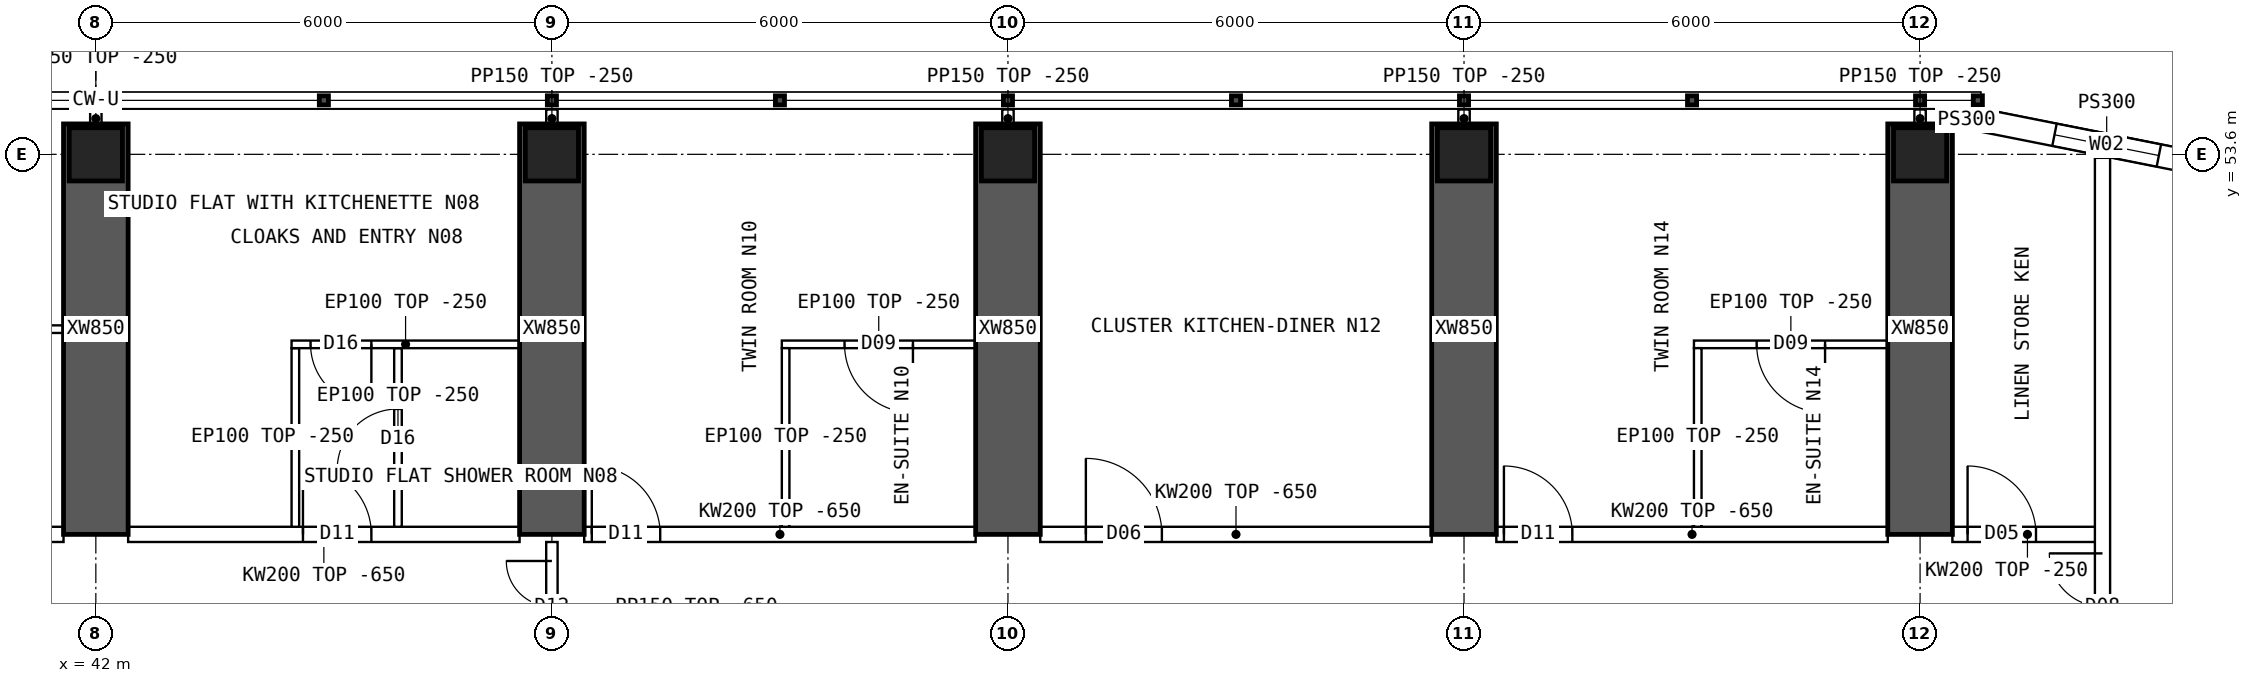
"""IFC4 building model, lengths in metres.
Left out: names, types, materials, properties, quantities, classifications, styles, units other than length and angle.
Written with IfcOpenShell. Run it as: python <this file> out.ifc"""

import sys

from ifc_helpers import new_model, si_unit, direction, frame, frame_2d, origin, origin_2d, place, context, subcontext, project, spatial, polyline, rectangle, hollow_rectangle, outline, extrude, element, fill, save


model = new_model("IFC4")
c1 = context("Model", 3, precision=1e-05, world=origin(), true_north=direction((0.0, 1.0)))
c2 = subcontext(c1, "Body", "Model", "MODEL_VIEW")
j1 = project(units=[si_unit("LENGTHUNIT", "METRE"), si_unit("PLANEANGLEUNIT", "RADIAN")], contexts=[c1])
p1 = place(None, origin())
s1 = spatial("IfcSite", under=j1, at=p1, CompositionType="ELEMENT")
p2 = place(p1, origin())
s2 = spatial("IfcBuilding", under=s1, at=p2, CompositionType="ELEMENT")
p3 = place(p2, frame((0.0, 0.0, 152.35)))
s3 = spatial("IfcBuildingStorey", under=s2, at=p3, CompositionType="ELEMENT", Elevation=152.35)
for number, where, z_axis, x_axis in (
    (1, (42.0, 53.6, 0.0), (0.0, 0.0, 1.0), (1.0, 0.0, 0.0)),
    (2, (48.0, 53.6, 0.0), (0.0, 0.0, 1.0), (1.0, 0.0, 0.0)),
    (3, (54.0, 53.6, 0.0), (0.0, 0.0, 1.0), (1.0, 0.0, 0.0)),
    (4, (60.0, 53.6, 0.0), (0.0, 0.0, 1.0), (1.0, 0.0, 0.0)),
    (5, (66.0, 53.6, 0.0), (0.0, 0.0, 1.0), (1.0, 0.0, 0.0)),
):
    element("IfcColumn", number, at=place(p3, frame(where, z_axis=z_axis, x_axis=x_axis)), inside=s3, PredefinedType="COLUMN", context=c2, shape_type="SweptSolid", body=[
        extrude(hollow_rectangle(XDim=0.7, YDim=0.7, WallThickness=0.07, at=origin_2d()), origin(), (0.0, 0.0, 1.0), 3.75),
    ])
for number, where, z_axis, x_axis in (
    (6, (42.0, 48.6, 0.0), (0.0, 0.0, 1.0), (0.0, 1.0, 0.0)),
    (7, (48.0, 48.6, 0.0), (0.0, 0.0, 1.0), (0.0, 1.0, 0.0)),
    (8, (54.0, 48.6, 0.0), (0.0, 0.0, 1.0), (0.0, 1.0, 0.0)),
    (9, (60.0, 48.6, 0.0), (0.0, 0.0, 1.0), (0.0, 1.0, 0.0)),
    (10, (66.0, 48.6, 0.0), (0.0, 0.0, 1.0), (0.0, 1.0, 0.0)),
):
    element("IfcWall", number, at=place(p3, frame(where, z_axis=z_axis, x_axis=x_axis)), inside=s3, PredefinedType="SHEAR", context=c2, shape_type="SweptSolid", body=[
        extrude(rectangle(XDim=5.4, YDim=0.85, at=frame_2d((2.7, 0.0))), origin(), (0.0, 0.0, 1.0), 3.75),
    ])
p4 = place(p3, frame((70.11, 53.392, 0.0), z_axis=(0.0, 0.0, 1.0), x_axis=(-0.98078325777, 0.195100490205, 0.0)))
e11 = element("IfcWall", 11, at=p4, inside=s3, PredefinedType="SOLIDWALL", context=c2, shape_type="SweptSolid", body=[
    extrude(outline(polyline([(-0.03, -0.15), (3.405, -0.15), (3.345, 0.15), (0.03, 0.15), (-0.03, -0.15)])), origin(), (0.0, 0.0, 1.0), 3.5),
])
p5 = place(p4, frame((0.988, 0.0, 0.9)))
e12 = element("IfcOpeningElement", 12, at=p5, cuts=e11, PredefinedType="OPENING", context=c2, shape_type="SweptSolid", body=[
    extrude(rectangle(XDim=1.4, YDim=1.8, at=frame_2d((0.7, 0.9))), frame((0.0, 0.16, 0.0), z_axis=(0.0, -1.0, 0.0), x_axis=(1.0, 0.0, 0.0)), (0.0, 0.0, 1.0), 0.32),
])
p6 = place(p3, frame((66.8, 54.05, 0.0), z_axis=(0.0, 0.0, 1.0), x_axis=(-1.0, 0.0, 0.0)))
e13 = element("IfcWall", 13, at=p6, inside=s3, PredefinedType="SOLIDWALL", context=c2, shape_type="SweptSolid", body=[
    extrude(rectangle(XDim=0.375, YDim=0.3, at=frame_2d((0.188, 0.0))), origin(), (0.0, 0.0, 1.0), 3.5),
])
p7 = place(p3, frame((36.425, 48.6, 0.0), z_axis=(0.0, 0.0, 1.0), x_axis=(1.0, 0.0, 0.0)))
e14 = element("IfcWall", 14, at=p7, inside=s3, PredefinedType="SOLIDWALL", context=c2, shape_type="SweptSolid", body=[
    extrude(outline(polyline([(0.0, 0.0), (5.15, 0.0), (5.15, 3.1), (0.0, 3.1), (0.0, 0.0)])), frame((0.0, 0.1, 0.0), z_axis=(0.0, -1.0, 0.0), x_axis=(1.0, 0.0, 0.0)), (0.0, 0.0, 1.0), 0.2),
])
p8 = place(p7, frame((0.3, 0.0, 0.0)))
e15 = element("IfcOpeningElement", 15, at=p8, cuts=e14, PredefinedType="OPENING", context=c2, shape_type="SweptSolid", body=[
    extrude(rectangle(XDim=1.0, YDim=2.1, at=frame_2d((0.5, 1.05))), frame((0.0, 0.11, 0.0), z_axis=(0.0, -1.0, 0.0), x_axis=(1.0, 0.0, 0.0)), (0.0, 0.0, 1.0), 0.22),
])
p9 = place(p3, frame((42.425, 48.6, 0.0), z_axis=(0.0, 0.0, 1.0), x_axis=(1.0, 0.0, 0.0)))
e16 = element("IfcWall", 16, at=p9, inside=s3, PredefinedType="SOLIDWALL", context=c2, shape_type="SweptSolid", body=[
    extrude(outline(polyline([(0.0, 0.0), (5.15, 0.0), (5.15, 3.1), (0.0, 3.1), (0.0, 0.0)])), frame((0.0, 0.1, 0.0), z_axis=(0.0, -1.0, 0.0), x_axis=(1.0, 0.0, 0.0)), (0.0, 0.0, 1.0), 0.2),
])
p10 = place(p9, frame((2.3, 0.0, 0.0)))
e17 = element("IfcOpeningElement", 17, at=p10, cuts=e16, PredefinedType="OPENING", context=c2, shape_type="SweptSolid", body=[
    extrude(rectangle(XDim=0.9, YDim=2.1, at=frame_2d((0.45, 1.05))), frame((0.0, 0.11, 0.0), z_axis=(0.0, -1.0, 0.0), x_axis=(1.0, 0.0, 0.0)), (0.0, 0.0, 1.0), 0.22),
])
p11 = place(p3, frame((48.425, 48.6, 0.0), z_axis=(0.0, 0.0, 1.0), x_axis=(1.0, 0.0, 0.0)))
e18 = element("IfcWall", 18, at=p11, inside=s3, PredefinedType="SOLIDWALL", context=c2, shape_type="SweptSolid", body=[
    extrude(outline(polyline([(0.0, 0.0), (5.15, 0.0), (5.15, 3.1), (0.0, 3.1), (0.0, 0.0)])), frame((0.0, 0.1, 0.0), z_axis=(0.0, -1.0, 0.0), x_axis=(1.0, 0.0, 0.0)), (0.0, 0.0, 1.0), 0.2),
])
p12 = place(p11, frame((0.1, 0.0, 0.0)))
e19 = element("IfcOpeningElement", 19, at=p12, cuts=e18, PredefinedType="OPENING", context=c2, shape_type="SweptSolid", body=[
    extrude(rectangle(XDim=0.9, YDim=2.1, at=frame_2d((0.45, 1.05))), frame((0.0, 0.11, 0.0), z_axis=(0.0, -1.0, 0.0), x_axis=(1.0, 0.0, 0.0)), (0.0, 0.0, 1.0), 0.22),
])
p13 = place(p3, frame((54.425, 48.6, 0.0), z_axis=(0.0, 0.0, 1.0), x_axis=(1.0, 0.0, 0.0)))
e20 = element("IfcWall", 20, at=p13, inside=s3, PredefinedType="SOLIDWALL", context=c2, shape_type="SweptSolid", body=[
    extrude(outline(polyline([(0.0, 0.0), (5.15, 0.0), (5.15, 3.1), (0.0, 3.1), (0.0, 0.0)])), frame((0.0, 0.1, 0.0), z_axis=(0.0, -1.0, 0.0), x_axis=(1.0, 0.0, 0.0)), (0.0, 0.0, 1.0), 0.2),
])
p14 = place(p13, frame((0.6, 0.0, 0.0)))
e21 = element("IfcOpeningElement", 21, at=p14, cuts=e20, PredefinedType="OPENING", context=c2, shape_type="SweptSolid", body=[
    extrude(rectangle(XDim=1.0, YDim=2.1, at=frame_2d((0.5, 1.05))), frame((0.0, 0.11, 0.0), z_axis=(0.0, -1.0, 0.0), x_axis=(1.0, 0.0, 0.0)), (0.0, 0.0, 1.0), 0.22),
])
p15 = place(p3, frame((60.425, 48.6, 0.0), z_axis=(0.0, 0.0, 1.0), x_axis=(1.0, 0.0, 0.0)))
e22 = element("IfcWall", 22, at=p15, inside=s3, PredefinedType="SOLIDWALL", context=c2, shape_type="SweptSolid", body=[
    extrude(outline(polyline([(0.0, 0.0), (5.15, 0.0), (5.15, 3.1), (0.0, 3.1), (0.0, 0.0)])), frame((0.0, 0.1, 0.0), z_axis=(0.0, -1.0, 0.0), x_axis=(1.0, 0.0, 0.0)), (0.0, 0.0, 1.0), 0.2),
])
p16 = place(p15, frame((0.1, 0.0, 0.0)))
e23 = element("IfcOpeningElement", 23, at=p16, cuts=e22, PredefinedType="OPENING", context=c2, shape_type="SweptSolid", body=[
    extrude(rectangle(XDim=0.9, YDim=2.1, at=frame_2d((0.45, 1.05))), frame((0.0, 0.11, 0.0), z_axis=(0.0, -1.0, 0.0), x_axis=(1.0, 0.0, 0.0)), (0.0, 0.0, 1.0), 0.22),
])
p17 = place(p3, frame((66.425, 48.6, 0.0), z_axis=(0.0, 0.0, 1.0), x_axis=(1.0, 0.0, 0.0)))
e24 = element("IfcWall", 24, at=p17, inside=s3, PredefinedType="SOLIDWALL", context=c2, shape_type="SweptSolid", body=[
    extrude(rectangle(XDim=1.975, YDim=0.2, at=frame_2d((0.987, 0.0))), origin(), (0.0, 0.0, 1.0), 3.5),
])
p18 = place(p17, frame((0.2, 0.0, 0.0)))
e25 = element("IfcOpeningElement", 25, at=p18, cuts=e24, PredefinedType="OPENING", context=c2, shape_type="SweptSolid", body=[
    extrude(rectangle(XDim=0.9, YDim=2.1, at=frame_2d((0.45, 1.05))), frame((0.0, 0.11, 0.0), z_axis=(0.0, -1.0, 0.0), x_axis=(1.0, 0.0, 0.0)), (0.0, 0.0, 1.0), 0.22),
])
p19 = place(p3, frame((38.925, 51.3, 0.0), z_axis=(0.0, 0.0, 1.0), x_axis=(1.0, 0.0, 0.0)))
e26 = element("IfcWall", 26, at=p19, inside=s3, PredefinedType="PARTITIONING", context=c2, shape_type="SweptSolid", body=[
    extrude(rectangle(XDim=2.65, YDim=0.1, at=frame_2d((1.325, 0.0))), origin(), (0.0, 0.0, 1.0), 3.5),
])
p20 = place(p3, frame((44.575, 51.1, 0.0), z_axis=(0.0, 0.0, 1.0), x_axis=(1.0, 0.0, 0.0)))
e27 = element("IfcWall", 27, at=p20, inside=s3, PredefinedType="PARTITIONING", context=c2, shape_type="SweptSolid", body=[
    extrude(rectangle(XDim=3.0, YDim=0.1, at=frame_2d((1.5, 0.0))), origin(), (0.0, 0.0, 1.0), 3.5),
])
p21 = place(p20, frame((0.25, 0.0, 0.0)))
e28 = element("IfcOpeningElement", 28, at=p21, cuts=e27, PredefinedType="OPENING", context=c2, shape_type="SweptSolid", body=[
    extrude(rectangle(XDim=0.8, YDim=2.1, at=frame_2d((0.4, 1.05))), frame((0.0, 0.06, 0.0), z_axis=(0.0, -1.0, 0.0), x_axis=(1.0, 0.0, 0.0)), (0.0, 0.0, 1.0), 0.12),
])
p22 = place(p3, frame((44.625, 51.05, 0.0), z_axis=(0.0, 0.0, 1.0), x_axis=(0.0, -1.0, 0.0)))
e29 = element("IfcWall", 29, at=p22, inside=s3, PredefinedType="PARTITIONING", context=c2, shape_type="SweptSolid", body=[
    extrude(outline(polyline([(0.0, 0.0), (2.35, 0.0), (2.35, 3.1), (2.302, 3.1), (2.3, 3.5), (0.0, 3.5), (0.0, 0.0)])), frame((0.0, 0.05, 0.0), z_axis=(0.0, -1.0, 0.0), x_axis=(1.0, 0.0, 0.0)), (0.0, 0.0, 1.0), 0.1),
])
p23 = place(p3, frame((45.975, 51.05, 0.0), z_axis=(0.0, 0.0, 1.0), x_axis=(0.0, -1.0, 0.0)))
e30 = element("IfcWall", 30, at=p23, inside=s3, PredefinedType="PARTITIONING", context=c2, shape_type="SweptSolid", body=[
    extrude(outline(polyline([(0.0, 0.0), (2.35, 0.0), (2.35, 3.1), (2.302, 3.1), (2.3, 3.5), (0.0, 3.5), (0.0, 0.0)])), frame((0.0, 0.05, 0.0), z_axis=(0.0, -1.0, 0.0), x_axis=(1.0, 0.0, 0.0)), (0.0, 0.0, 1.0), 0.1),
])
p24 = place(p23, frame((0.8, 0.0, 0.0)))
e31 = element("IfcOpeningElement", 31, at=p24, cuts=e30, PredefinedType="OPENING", context=c2, shape_type="SweptSolid", body=[
    extrude(rectangle(XDim=0.8, YDim=2.1, at=frame_2d((0.4, 1.05))), frame((0.0, 0.06, 0.0), z_axis=(0.0, -1.0, 0.0), x_axis=(1.0, 0.0, 0.0)), (0.0, 0.0, 1.0), 0.12),
])
p25 = place(p3, frame((51.025, 51.1, 0.0), z_axis=(0.0, 0.0, 1.0), x_axis=(1.0, 0.0, 0.0)))
e32 = element("IfcWall", 32, at=p25, inside=s3, PredefinedType="PARTITIONING", context=c2, shape_type="SweptSolid", body=[
    extrude(rectangle(XDim=2.55, YDim=0.1, at=frame_2d((1.275, 0.0))), origin(), (0.0, 0.0, 1.0), 3.5),
])
p26 = place(p25, frame((0.825, 0.0, 0.0)))
e33 = element("IfcOpeningElement", 33, at=p26, cuts=e32, PredefinedType="OPENING", context=c2, shape_type="SweptSolid", body=[
    extrude(rectangle(XDim=0.9, YDim=2.1, at=frame_2d((0.45, 1.05))), frame((0.0, 0.06, 0.0), z_axis=(0.0, -1.0, 0.0), x_axis=(1.0, 0.0, 0.0)), (0.0, 0.0, 1.0), 0.12),
])
p27 = place(p3, frame((51.075, 51.05, 0.0), z_axis=(0.0, 0.0, 1.0), x_axis=(0.0, -1.0, 0.0)))
e34 = element("IfcWall", 34, at=p27, inside=s3, PredefinedType="PARTITIONING", context=c2, shape_type="SweptSolid", body=[
    extrude(outline(polyline([(0.0, 0.0), (2.35, 0.0), (2.35, 3.1), (2.302, 3.1), (2.3, 3.5), (0.0, 3.5), (0.0, 0.0)])), frame((0.0, 0.05, 0.0), z_axis=(0.0, -1.0, 0.0), x_axis=(1.0, 0.0, 0.0)), (0.0, 0.0, 1.0), 0.1),
])
p28 = place(p3, frame((63.025, 51.1, 0.0), z_axis=(0.0, 0.0, 1.0), x_axis=(1.0, 0.0, 0.0)))
e35 = element("IfcWall", 35, at=p28, inside=s3, PredefinedType="PARTITIONING", context=c2, shape_type="SweptSolid", body=[
    extrude(rectangle(XDim=2.55, YDim=0.1, at=frame_2d((1.275, 0.0))), origin(), (0.0, 0.0, 1.0), 3.5),
])
p29 = place(p28, frame((0.825, 0.0, 0.0)))
e36 = element("IfcOpeningElement", 36, at=p29, cuts=e35, PredefinedType="OPENING", context=c2, shape_type="SweptSolid", body=[
    extrude(rectangle(XDim=0.9, YDim=2.1, at=frame_2d((0.45, 1.05))), frame((0.0, 0.06, 0.0), z_axis=(0.0, -1.0, 0.0), x_axis=(1.0, 0.0, 0.0)), (0.0, 0.0, 1.0), 0.12),
])
p30 = place(p3, frame((63.075, 51.05, 0.0), z_axis=(0.0, 0.0, 1.0), x_axis=(0.0, -1.0, 0.0)))
e37 = element("IfcWall", 37, at=p30, inside=s3, PredefinedType="PARTITIONING", context=c2, shape_type="SweptSolid", body=[
    extrude(outline(polyline([(0.0, 0.0), (2.35, 0.0), (2.35, 3.1), (2.302, 3.1), (2.3, 3.5), (0.0, 3.5), (0.0, 0.0)])), frame((0.0, 0.05, 0.0), z_axis=(0.0, -1.0, 0.0), x_axis=(1.0, 0.0, 0.0)), (0.0, 0.0, 1.0), 0.1),
])
p31 = place(p3, frame((48.0, 46.8, 0.0), z_axis=(0.0, 0.0, 1.0), x_axis=(0.0, 1.0, 0.0)))
e38 = element("IfcWall", 38, at=p31, inside=s3, PredefinedType="PARTITIONING", context=c2, shape_type="SweptSolid", body=[
    extrude(outline(polyline([(0.0, 0.0), (1.7, 0.0), (1.7, 3.1), (0.0, 3.1), (0.0, 0.0)])), frame((0.0, 0.075, 0.0), z_axis=(0.0, -1.0, 0.0), x_axis=(1.0, 0.0, 0.0)), (0.0, 0.0, 1.0), 0.15),
])
p32 = place(p31, frame((0.25, 0.0, 0.0)))
e39 = element("IfcOpeningElement", 39, at=p32, cuts=e38, PredefinedType="OPENING", context=c2, shape_type="SweptSolid", body=[
    extrude(rectangle(XDim=1.2, YDim=2.1, at=frame_2d((0.6, 1.05))), frame((0.0, 0.085, 0.0), z_axis=(0.0, -1.0, 0.0), x_axis=(1.0, 0.0, 0.0)), (0.0, 0.0, 1.0), 0.17),
])
p33 = place(p3, frame((68.4, 10.446, 0.0), z_axis=(0.0, 0.0, 1.0), x_axis=(0.0, 1.0, 0.0)))
e40 = element("IfcWall", 40, at=p33, inside=s3, PredefinedType="SOLIDWALL", context=c2, shape_type="SweptSolid", body=[
    extrude(rectangle(XDim=43.107, YDim=0.2, at=frame_2d((21.554, 0.0))), origin(), (0.0, 0.0, 1.0), 3.5),
])
p34 = place(p33, frame((27.994, 0.0, 0.0)))
e41 = element("IfcOpeningElement", 41, at=p34, cuts=e40, PredefinedType="OPENING", context=c2, shape_type="SweptSolid", body=[
    extrude(rectangle(XDim=1.2, YDim=2.1, at=frame_2d((0.6, 1.05))), frame((0.0, 0.11, 0.0), z_axis=(0.0, -1.0, 0.0), x_axis=(1.0, 0.0, 0.0)), (0.0, 0.0, 1.0), 0.22),
])
p35 = place(p33, frame((5.104, 0.0, 0.0)))
e42 = element("IfcOpeningElement", 42, at=p35, cuts=e40, PredefinedType="OPENING", context=c2, shape_type="SweptSolid", body=[
    extrude(rectangle(XDim=1.4, YDim=2.1, at=frame_2d((0.7, 1.05))), frame((0.0, 0.11, 0.0), z_axis=(0.0, -1.0, 0.0), x_axis=(1.0, 0.0, 0.0)), (0.0, 0.0, 1.0), 0.22),
])
p36 = place(p33, frame((36.504, 0.0, 0.0)))
e43 = element("IfcOpeningElement", 43, at=p36, cuts=e40, PredefinedType="OPENING", context=c2, shape_type="SweptSolid", body=[
    extrude(rectangle(XDim=1.4, YDim=2.1, at=frame_2d((0.7, 1.05))), frame((0.0, 0.11, 0.0), z_axis=(0.0, -1.0, 0.0), x_axis=(1.0, 0.0, 0.0)), (0.0, 0.0, 1.0), 0.22),
])
for number, where, z_axis, x_axis in (
    (44, (42.0, 53.95, 0.0), (0.0, 0.0, 1.0), (0.0, 1.0, 0.0)),
    (45, (48.0, 53.95, 0.0), (0.0, 0.0, 1.0), (0.0, 1.0, 0.0)),
    (46, (54.0, 53.95, 0.0), (0.0, 0.0, 1.0), (0.0, 1.0, 0.0)),
    (47, (60.0, 53.95, 0.0), (0.0, 0.0, 1.0), (0.0, 1.0, 0.0)),
    (48, (66.0, 53.95, 0.0), (0.0, 0.0, 1.0), (0.0, 1.0, 0.0)),
):
    element("IfcWall", number, at=place(p3, frame(where, z_axis=z_axis, x_axis=x_axis)), inside=s3, PredefinedType="PARTITIONING", context=c2, shape_type="SweptSolid", body=[
        extrude(rectangle(XDim=0.24, YDim=0.15, at=frame_2d((0.12, 0.0))), origin(), (0.0, 0.0, 1.0), 3.5),
    ])
p37 = place(p5, origin())
e49 = element("IfcWindow", 49, at=p37, inside=s3, PartitioningType="SINGLE_PANEL", PredefinedType="WINDOW", context=c2, shape_type="SweptSolid", body=[
    extrude(rectangle(XDim=1.4, YDim=1.8, at=frame_2d((0.7, 0.9))), frame((0.0, 0.03, 0.0), z_axis=(0.0, -1.0, 0.0), x_axis=(1.0, 0.0, 0.0)), (0.0, 0.0, 1.0), 0.06),
])
fill(e12, e49)
p38 = place(p21, origin())
e50 = element("IfcDoor", 50, at=p38, inside=s3, OperationType="SINGLE_SWING_RIGHT", PredefinedType="DOOR", context=c2, shape_type="SweptSolid", body=[
    extrude(rectangle(XDim=0.8, YDim=2.1, at=frame_2d((0.4, 1.05))), frame((0.0, 0.025, 0.0), z_axis=(0.0, -1.0, 0.0), x_axis=(1.0, 0.0, 0.0)), (0.0, 0.0, 1.0), 0.05),
])
fill(e28, e50)
p39 = place(p24, origin())
e51 = element("IfcDoor", 51, at=p39, inside=s3, OperationType="SINGLE_SWING_RIGHT", PredefinedType="DOOR", context=c2, shape_type="SweptSolid", body=[
    extrude(rectangle(XDim=0.8, YDim=2.1, at=frame_2d((0.4, 1.05))), frame((0.0, 0.025, 0.0), z_axis=(0.0, -1.0, 0.0), x_axis=(1.0, 0.0, 0.0)), (0.0, 0.0, 1.0), 0.05),
])
fill(e31, e51)
p40 = place(p10, origin())
e52 = element("IfcDoor", 52, at=p40, inside=s3, OperationType="SINGLE_SWING_LEFT", PredefinedType="DOOR", context=c2, shape_type="SweptSolid", body=[
    extrude(rectangle(XDim=0.9, YDim=2.1, at=frame_2d((0.45, 1.05))), frame((0.0, 0.025, 0.0), z_axis=(0.0, -1.0, 0.0), x_axis=(1.0, 0.0, 0.0)), (0.0, 0.0, 1.0), 0.05),
])
fill(e17, e52)
p41 = place(p26, origin())
e53 = element("IfcDoor", 53, at=p41, inside=s3, OperationType="SINGLE_SWING_RIGHT", PredefinedType="DOOR", context=c2, shape_type="SweptSolid", body=[
    extrude(rectangle(XDim=0.9, YDim=2.1, at=frame_2d((0.45, 1.05))), frame((0.0, 0.025, 0.0), z_axis=(0.0, -1.0, 0.0), x_axis=(1.0, 0.0, 0.0)), (0.0, 0.0, 1.0), 0.05),
])
fill(e33, e53)
p42 = place(p12, origin())
e54 = element("IfcDoor", 54, at=p42, inside=s3, OperationType="SINGLE_SWING_LEFT", PredefinedType="DOOR", context=c2, shape_type="SweptSolid", body=[
    extrude(rectangle(XDim=0.9, YDim=2.1, at=frame_2d((0.45, 1.05))), frame((0.0, 0.025, 0.0), z_axis=(0.0, -1.0, 0.0), x_axis=(1.0, 0.0, 0.0)), (0.0, 0.0, 1.0), 0.05),
])
fill(e19, e54)
p43 = place(p14, origin())
e55 = element("IfcDoor", 55, at=p43, inside=s3, OperationType="SINGLE_SWING_LEFT", PredefinedType="DOOR", context=c2, shape_type="SweptSolid", body=[
    extrude(rectangle(XDim=1.0, YDim=2.1, at=frame_2d((0.5, 1.05))), frame((0.0, 0.025, 0.0), z_axis=(0.0, -1.0, 0.0), x_axis=(1.0, 0.0, 0.0)), (0.0, 0.0, 1.0), 0.05),
])
fill(e21, e55)
p44 = place(p29, origin())
e56 = element("IfcDoor", 56, at=p44, inside=s3, OperationType="SINGLE_SWING_RIGHT", PredefinedType="DOOR", context=c2, shape_type="SweptSolid", body=[
    extrude(rectangle(XDim=0.9, YDim=2.1, at=frame_2d((0.45, 1.05))), frame((0.0, 0.025, 0.0), z_axis=(0.0, -1.0, 0.0), x_axis=(1.0, 0.0, 0.0)), (0.0, 0.0, 1.0), 0.05),
])
fill(e36, e56)
p45 = place(p16, origin())
e57 = element("IfcDoor", 57, at=p45, inside=s3, OperationType="SINGLE_SWING_LEFT", PredefinedType="DOOR", context=c2, shape_type="SweptSolid", body=[
    extrude(rectangle(XDim=0.9, YDim=2.1, at=frame_2d((0.45, 1.05))), frame((0.0, 0.025, 0.0), z_axis=(0.0, -1.0, 0.0), x_axis=(1.0, 0.0, 0.0)), (0.0, 0.0, 1.0), 0.05),
])
fill(e23, e57)
p46 = place(p32, origin())
e58 = element("IfcDoor", 58, at=p46, inside=s3, OperationType="DOUBLE_DOOR_SINGLE_SWING", PredefinedType="DOOR", context=c2, shape_type="SweptSolid", body=[
    extrude(rectangle(XDim=1.2, YDim=2.1, at=frame_2d((0.6, 1.05))), frame((0.0, 0.025, 0.0), z_axis=(0.0, -1.0, 0.0), x_axis=(1.0, 0.0, 0.0)), (0.0, 0.0, 1.0), 0.05),
])
fill(e39, e58)
p47 = place(p36, origin())
e59 = element("IfcDoor", 59, at=p47, inside=s3, OperationType="DOUBLE_DOOR_SINGLE_SWING", PredefinedType="DOOR", context=c2, shape_type="SweptSolid", body=[
    extrude(rectangle(XDim=1.4, YDim=2.1, at=frame_2d((0.7, 1.05))), frame((0.0, 0.025, 0.0), z_axis=(0.0, -1.0, 0.0), x_axis=(1.0, 0.0, 0.0)), (0.0, 0.0, 1.0), 0.05),
])
fill(e43, e59)
p48 = place(p18, origin())
e60 = element("IfcDoor", 60, at=p48, inside=s3, OperationType="SINGLE_SWING_LEFT", PredefinedType="DOOR", context=c2, shape_type="SweptSolid", body=[
    extrude(rectangle(XDim=0.9, YDim=2.1, at=frame_2d((0.45, 1.05))), frame((0.0, 0.025, 0.0), z_axis=(0.0, -1.0, 0.0), x_axis=(1.0, 0.0, 0.0)), (0.0, 0.0, 1.0), 0.05),
])
fill(e25, e60)
save(model, sys.argv[1])
